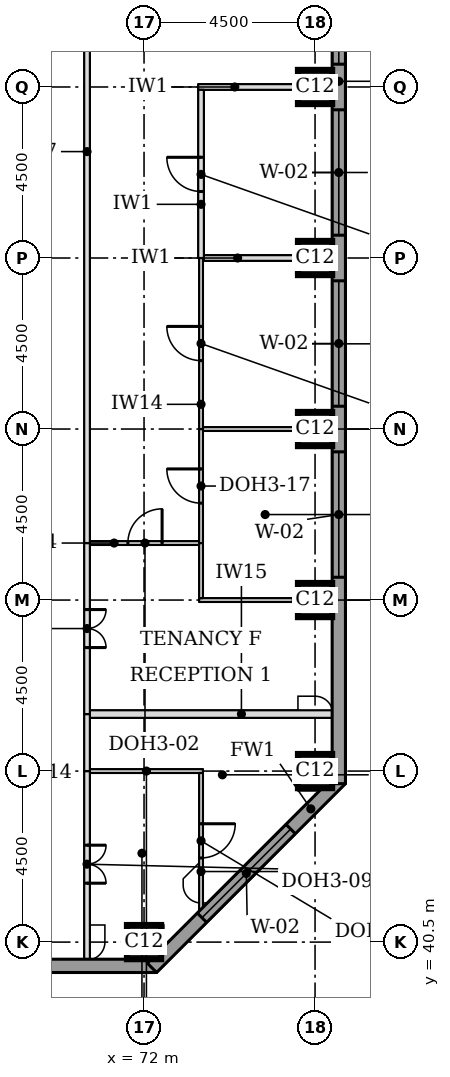
"""IFC4 building model, lengths in metres.
Left out: names, types, materials, properties, quantities, classifications, styles, units other than length and angle.
Written with IfcOpenShell. Run it as: python <this file> out.ifc"""

import sys

from ifc_helpers import new_model, si_unit, direction, frame, frame_2d, origin, origin_2d, place, context, subcontext, project, spatial, rectangle, extrude, element, fill, save


model = new_model("IFC4")
c1 = context("Model", 3, precision=1e-05, world=origin(), true_north=direction((0.0, 1.0)))
c2 = subcontext(c1, "Body", "Model", "MODEL_VIEW")
j1 = project(units=[si_unit("LENGTHUNIT", "METRE"), si_unit("PLANEANGLEUNIT", "RADIAN")], contexts=[c1])
p1 = place(None, origin())
s1 = spatial("IfcSite", under=j1, at=p1, CompositionType="ELEMENT")
p2 = place(p1, origin())
s2 = spatial("IfcBuilding", under=s1, at=p2, CompositionType="ELEMENT")
p3 = place(p2, frame((0.0, 0.0, 162.5)))
s3 = spatial("IfcBuildingStorey", under=s2, at=p3, CompositionType="ELEMENT", Elevation=162.5)
for number, where, z_axis, x_axis in (
    (1, (72.0, 40.5, 0.0), (0.0, 0.0, 1.0), (1.0, 0.0, 0.0)),
    (2, (76.5, 45.0, 0.0), (0.0, 0.0, 1.0), (1.0, 0.0, 0.0)),
    (3, (76.5, 49.5, 0.0), (0.0, 0.0, 1.0), (1.0, 0.0, 0.0)),
    (4, (76.5, 54.0, 0.0), (0.0, 0.0, 1.0), (1.0, 0.0, 0.0)),
    (5, (76.5, 58.5, 0.0), (0.0, 0.0, 1.0), (1.0, 0.0, 0.0)),
    (6, (76.5, 63.0, 0.0), (0.0, 0.0, 1.0), (1.0, 0.0, 0.0)),
):
    element("IfcColumn", number, at=place(p3, frame(where, z_axis=z_axis, x_axis=x_axis)), inside=s3, PredefinedType="COLUMN", context=c2, shape_type="SweptSolid", body=[
        extrude(rectangle(XDim=0.9, YDim=0.9, at=origin_2d()), origin(), (0.0, 0.0, 1.0), 3.7),
    ])
p4 = place(p3, frame((36.0, 39.875, 0.0), z_axis=(0.0, 0.0, 1.0), x_axis=(1.0, 0.0, 0.0)))
e7 = element("IfcWall", 7, at=p4, inside=s3, PredefinedType="STANDARD", context=c2, shape_type="SweptSolid", body=[
    extrude(rectangle(XDim=36.331, YDim=0.35, at=frame_2d((18.166, 0.0))), origin(), (0.0, 0.0, 1.0), 3.525),
])
p5 = place(p4, frame((5.1, 0.0, 0.9)))
e8 = element("IfcOpeningElement", 8, at=p5, cuts=e7, PredefinedType="OPENING", context=c2, shape_type="SweptSolid", body=[
    extrude(rectangle(XDim=3.3, YDim=1.9, at=frame_2d((1.65, 0.95))), frame((0.0, 0.185, 0.0), z_axis=(0.0, -1.0, 0.0), x_axis=(1.0, 0.0, 0.0)), (0.0, 0.0, 1.0), 0.37),
])
p6 = place(p4, frame((9.6, 0.0, 0.9)))
e9 = element("IfcOpeningElement", 9, at=p6, cuts=e7, PredefinedType="OPENING", context=c2, shape_type="SweptSolid", body=[
    extrude(rectangle(XDim=3.3, YDim=1.9, at=frame_2d((1.65, 0.95))), frame((0.0, 0.185, 0.0), z_axis=(0.0, -1.0, 0.0), x_axis=(1.0, 0.0, 0.0)), (0.0, 0.0, 1.0), 0.37),
])
p7 = place(p4, frame((14.1, 0.0, 0.9)))
e10 = element("IfcOpeningElement", 10, at=p7, cuts=e7, PredefinedType="OPENING", context=c2, shape_type="SweptSolid", body=[
    extrude(rectangle(XDim=3.3, YDim=1.9, at=frame_2d((1.65, 0.95))), frame((0.0, 0.185, 0.0), z_axis=(0.0, -1.0, 0.0), x_axis=(1.0, 0.0, 0.0)), (0.0, 0.0, 1.0), 0.37),
])
p8 = place(p4, frame((18.6, 0.0, 0.9)))
e11 = element("IfcOpeningElement", 11, at=p8, cuts=e7, PredefinedType="OPENING", context=c2, shape_type="SweptSolid", body=[
    extrude(rectangle(XDim=3.3, YDim=1.9, at=frame_2d((1.65, 0.95))), frame((0.0, 0.185, 0.0), z_axis=(0.0, -1.0, 0.0), x_axis=(1.0, 0.0, 0.0)), (0.0, 0.0, 1.0), 0.37),
])
p9 = place(p4, frame((23.1, 0.0, 0.9)))
e12 = element("IfcOpeningElement", 12, at=p9, cuts=e7, PredefinedType="OPENING", context=c2, shape_type="SweptSolid", body=[
    extrude(rectangle(XDim=3.3, YDim=1.9, at=frame_2d((1.65, 0.95))), frame((0.0, 0.185, 0.0), z_axis=(0.0, -1.0, 0.0), x_axis=(1.0, 0.0, 0.0)), (0.0, 0.0, 1.0), 0.37),
])
p10 = place(p4, frame((27.6, 0.0, 0.9)))
e13 = element("IfcOpeningElement", 13, at=p10, cuts=e7, PredefinedType="OPENING", context=c2, shape_type="SweptSolid", body=[
    extrude(rectangle(XDim=3.3, YDim=1.9, at=frame_2d((1.65, 0.95))), frame((0.0, 0.185, 0.0), z_axis=(0.0, -1.0, 0.0), x_axis=(1.0, 0.0, 0.0)), (0.0, 0.0, 1.0), 0.37),
])
p11 = place(p3, frame((72.208, 39.824, 0.0), z_axis=(0.0, 0.0, 1.0), x_axis=(0.707106781187, 0.707106781187, 0.0)))
e14 = element("IfcWall", 14, at=p11, inside=s3, PredefinedType="STANDARD", context=c2, shape_type="SweptSolid", body=[
    extrude(rectangle(XDim=7.027, YDim=0.35, at=frame_2d((3.513, 0.0))), origin(), (0.0, 0.0, 1.0), 3.525),
])
p12 = place(p11, frame((1.863, 0.0, 0.9)))
e15 = element("IfcOpeningElement", 15, at=p12, cuts=e14, PredefinedType="OPENING", context=c2, shape_type="SweptSolid", body=[
    extrude(rectangle(XDim=3.3, YDim=1.9, at=frame_2d((1.65, 0.95))), frame((0.0, 0.185, 0.0), z_axis=(0.0, -1.0, 0.0), x_axis=(1.0, 0.0, 0.0)), (0.0, 0.0, 1.0), 0.37),
])
p13 = place(p3, frame((77.125, 44.669, 0.0), z_axis=(0.0, 0.0, 1.0), x_axis=(0.0, 1.0, 0.0)))
e16 = element("IfcWall", 16, at=p13, inside=s3, PredefinedType="STANDARD", context=c2, shape_type="SweptSolid", body=[
    extrude(rectangle(XDim=32.163, YDim=0.35, at=frame_2d((16.081, 0.0))), origin(), (0.0, 0.0, 1.0), 3.525),
])
p14 = place(p13, frame((5.431, 0.0, 0.9)))
e17 = element("IfcOpeningElement", 17, at=p14, cuts=e16, PredefinedType="OPENING", context=c2, shape_type="SweptSolid", body=[
    extrude(rectangle(XDim=3.3, YDim=1.9, at=frame_2d((1.65, 0.95))), frame((0.0, 0.185, 0.0), z_axis=(0.0, -1.0, 0.0), x_axis=(1.0, 0.0, 0.0)), (0.0, 0.0, 1.0), 0.37),
])
p15 = place(p13, frame((9.931, 0.0, 0.9)))
e18 = element("IfcOpeningElement", 18, at=p15, cuts=e16, PredefinedType="OPENING", context=c2, shape_type="SweptSolid", body=[
    extrude(rectangle(XDim=3.3, YDim=1.9, at=frame_2d((1.65, 0.95))), frame((0.0, 0.185, 0.0), z_axis=(0.0, -1.0, 0.0), x_axis=(1.0, 0.0, 0.0)), (0.0, 0.0, 1.0), 0.37),
])
p16 = place(p13, frame((14.431, 0.0, 0.9)))
e19 = element("IfcOpeningElement", 19, at=p16, cuts=e16, PredefinedType="OPENING", context=c2, shape_type="SweptSolid", body=[
    extrude(rectangle(XDim=3.3, YDim=1.9, at=frame_2d((1.65, 0.95))), frame((0.0, 0.185, 0.0), z_axis=(0.0, -1.0, 0.0), x_axis=(1.0, 0.0, 0.0)), (0.0, 0.0, 1.0), 0.37),
])
p17 = place(p13, frame((18.931, 0.0, 0.9)))
e20 = element("IfcOpeningElement", 20, at=p17, cuts=e16, PredefinedType="OPENING", context=c2, shape_type="SweptSolid", body=[
    extrude(rectangle(XDim=3.3, YDim=1.9, at=frame_2d((1.65, 0.95))), frame((0.0, 0.185, 0.0), z_axis=(0.0, -1.0, 0.0), x_axis=(1.0, 0.0, 0.0)), (0.0, 0.0, 1.0), 0.37),
])
p18 = place(p13, frame((23.431, 0.0, 0.9)))
e21 = element("IfcOpeningElement", 21, at=p18, cuts=e16, PredefinedType="OPENING", context=c2, shape_type="SweptSolid", body=[
    extrude(rectangle(XDim=3.3, YDim=1.9, at=frame_2d((1.65, 0.95))), frame((0.0, 0.185, 0.0), z_axis=(0.0, -1.0, 0.0), x_axis=(1.0, 0.0, 0.0)), (0.0, 0.0, 1.0), 0.37),
])
p19 = place(p3, frame((70.575, 45.0, 0.0), z_axis=(0.0, 0.0, 1.0), x_axis=(1.0, 0.0, 0.0)))
e22 = element("IfcWall", 22, at=p19, inside=s3, PredefinedType="PARTITIONING", context=c2, shape_type="SweptSolid", body=[
    extrude(rectangle(XDim=2.975, YDim=0.1, at=frame_2d((1.488, 0.0))), origin(), (0.0, 0.0, 1.0), 3.096),
])
p20 = place(p3, frame((70.575, 46.5, 0.0), z_axis=(0.0, 0.0, 1.0), x_axis=(1.0, 0.0, 0.0)))
e23 = element("IfcWall", 23, at=p20, inside=s3, PredefinedType="PARTITIONING", context=c2, shape_type="SweptSolid", body=[
    extrude(rectangle(XDim=6.375, YDim=0.2, at=frame_2d((3.188, 0.0))), origin(), (0.0, 0.0, 1.0), 3.55),
])
p21 = place(p3, frame((73.45, 49.5, 0.0), z_axis=(0.0, 0.0, 1.0), x_axis=(1.0, 0.0, 0.0)))
e24 = element("IfcWall", 24, at=p21, inside=s3, PredefinedType="PARTITIONING", context=c2, shape_type="SweptSolid", body=[
    extrude(rectangle(XDim=3.5, YDim=0.1, at=frame_2d((1.75, 0.0))), origin(), (0.0, 0.0, 1.0), 3.55),
])
p22 = place(p3, frame((70.575, 51.0, 0.0), z_axis=(0.0, 0.0, 1.0), x_axis=(1.0, 0.0, 0.0)))
e25 = element("IfcWall", 25, at=p22, inside=s3, PredefinedType="PARTITIONING", context=c2, shape_type="SweptSolid", body=[
    extrude(rectangle(XDim=2.875, YDim=0.1, at=frame_2d((1.438, 0.0))), origin(), (0.0, 0.0, 1.0), 3.55),
])
p23 = place(p22, frame((1.0, 0.0, 0.0)))
e26 = element("IfcOpeningElement", 26, at=p23, cuts=e25, PredefinedType="OPENING", context=c2, shape_type="SweptSolid", body=[
    extrude(rectangle(XDim=0.9, YDim=2.1, at=frame_2d((0.45, 1.05))), frame((0.0, 0.06, 0.0), z_axis=(0.0, -1.0, 0.0), x_axis=(1.0, 0.0, 0.0)), (0.0, 0.0, 1.0), 0.12),
])
p24 = place(p3, frame((73.55, 54.0, 0.0), z_axis=(0.0, 0.0, 1.0), x_axis=(1.0, 0.0, 0.0)))
e27 = element("IfcWall", 27, at=p24, inside=s3, PredefinedType="PARTITIONING", context=c2, shape_type="SweptSolid", body=[
    extrude(rectangle(XDim=3.4, YDim=0.1, at=frame_2d((1.7, 0.0))), origin(), (0.0, 0.0, 1.0), 3.55),
])
p25 = place(p3, frame((73.575, 58.5, 0.0), z_axis=(0.0, 0.0, 1.0), x_axis=(1.0, 0.0, 0.0)))
e28 = element("IfcWall", 28, at=p25, inside=s3, PredefinedType="PARTITIONING", context=c2, shape_type="SweptSolid", body=[
    extrude(rectangle(XDim=3.375, YDim=0.15, at=frame_2d((1.688, 0.0))), origin(), (0.0, 0.0, 1.0), 3.55),
])
p26 = place(p3, frame((73.425, 63.0, 0.0), z_axis=(0.0, 0.0, 1.0), x_axis=(1.0, 0.0, 0.0)))
e29 = element("IfcWall", 29, at=p26, inside=s3, PredefinedType="PARTITIONING", context=c2, shape_type="SweptSolid", body=[
    extrude(rectangle(XDim=3.525, YDim=0.15, at=frame_2d((1.762, 0.0))), origin(), (0.0, 0.0, 1.0), 3.55),
])
p27 = place(p3, frame((70.5, 40.05, 0.0), z_axis=(0.0, 0.0, 1.0), x_axis=(0.0, 1.0, 0.0)))
e30 = element("IfcWall", 30, at=p27, inside=s3, PredefinedType="PARTITIONING", context=c2, shape_type="SweptSolid", body=[
    extrude(rectangle(XDim=4.95, YDim=0.15, at=frame_2d((2.475, 0.0))), origin(), (0.0, 0.0, 1.0), 3.55),
])
p28 = place(p27, frame((2.0, 0.0, 0.0)))
e31 = element("IfcOpeningElement", 31, at=p28, cuts=e30, PredefinedType="OPENING", context=c2, shape_type="SweptSolid", body=[
    extrude(rectangle(XDim=1.0, YDim=2.1, at=frame_2d((0.5, 1.05))), frame((0.0, 0.085, 0.0), z_axis=(0.0, -1.0, 0.0), x_axis=(1.0, 0.0, 0.0)), (0.0, 0.0, 1.0), 0.17),
])
p29 = place(p3, frame((73.5, 41.364, 0.0), z_axis=(0.0, 0.0, 1.0), x_axis=(0.0, 1.0, 0.0)))
e32 = element("IfcWall", 32, at=p29, inside=s3, PredefinedType="PARTITIONING", context=c2, shape_type="SweptSolid", body=[
    extrude(rectangle(XDim=3.586, YDim=0.1, at=frame_2d((1.793, 0.0))), origin(), (0.0, 0.0, 1.0), 3.55),
])
p30 = place(p29, frame((1.35, 0.0, 0.0)))
e33 = element("IfcOpeningElement", 33, at=p30, cuts=e32, PredefinedType="OPENING", context=c2, shape_type="SweptSolid", body=[
    extrude(rectangle(XDim=0.9, YDim=2.1, at=frame_2d((0.45, 1.05))), frame((0.0, 0.06, 0.0), z_axis=(0.0, -1.0, 0.0), x_axis=(1.0, 0.0, 0.0)), (0.0, 0.0, 1.0), 0.12),
])
p31 = place(p3, frame((70.5, 45.0, 0.0), z_axis=(0.0, 0.0, 1.0), x_axis=(0.0, 1.0, 0.0)))
e34 = element("IfcWall", 34, at=p31, inside=s3, PredefinedType="PARTITIONING", context=c2, shape_type="SweptSolid", body=[
    extrude(rectangle(XDim=1.5, YDim=0.15, at=frame_2d((0.75, 0.0))), origin(), (0.0, 0.0, 1.0), 3.55),
])
p32 = place(p3, frame((70.5, 46.5, 0.0), z_axis=(0.0, 0.0, 1.0), x_axis=(0.0, 1.0, 0.0)))
e35 = element("IfcWall", 35, at=p32, inside=s3, PredefinedType="PARTITIONING", context=c2, shape_type="SweptSolid", body=[
    extrude(rectangle(XDim=4.5, YDim=0.15, at=frame_2d((2.25, 0.0))), origin(), (0.0, 0.0, 1.0), 3.55),
])
p33 = place(p32, frame((1.75, 0.0, 0.0)))
e36 = element("IfcOpeningElement", 36, at=p33, cuts=e35, PredefinedType="OPENING", context=c2, shape_type="SweptSolid", body=[
    extrude(rectangle(XDim=1.0, YDim=2.1, at=frame_2d((0.5, 1.05))), frame((0.0, 0.085, 0.0), z_axis=(0.0, -1.0, 0.0), x_axis=(1.0, 0.0, 0.0)), (0.0, 0.0, 1.0), 0.17),
])
p34 = place(p3, frame((73.5, 49.55, 0.0), z_axis=(0.0, 0.0, 1.0), x_axis=(0.0, 1.0, 0.0)))
e37 = element("IfcWall", 37, at=p34, inside=s3, PredefinedType="PARTITIONING", context=c2, shape_type="SweptSolid", body=[
    extrude(rectangle(XDim=1.45, YDim=0.1, at=frame_2d((0.725, 0.0))), origin(), (0.0, 0.0, 1.0), 3.55),
])
p35 = place(p3, frame((70.5, 51.0, 0.0), z_axis=(0.0, 0.0, 1.0), x_axis=(0.0, 1.0, 0.0)))
e38 = element("IfcWall", 38, at=p35, inside=s3, PredefinedType="PARTITIONING", context=c2, shape_type="SweptSolid", body=[
    extrude(rectangle(XDim=27.0, YDim=0.15, at=frame_2d((13.5, 0.0))), origin(), (0.0, 0.0, 1.0), 3.55),
])
p36 = place(p3, frame((73.5, 51.0, 0.0), z_axis=(0.0, 0.0, 1.0), x_axis=(0.0, 1.0, 0.0)))
e39 = element("IfcWall", 39, at=p36, inside=s3, PredefinedType="PARTITIONING", context=c2, shape_type="SweptSolid", body=[
    extrude(rectangle(XDim=3.0, YDim=0.1, at=frame_2d((1.5, 0.0))), origin(), (0.0, 0.0, 1.0), 3.55),
])
p37 = place(p36, frame((1.05, 0.0, 0.0)))
e40 = element("IfcOpeningElement", 40, at=p37, cuts=e39, PredefinedType="OPENING", context=c2, shape_type="SweptSolid", body=[
    extrude(rectangle(XDim=0.9, YDim=2.1, at=frame_2d((0.45, 1.05))), frame((0.0, 0.06, 0.0), z_axis=(0.0, -1.0, 0.0), x_axis=(1.0, 0.0, 0.0)), (0.0, 0.0, 1.0), 0.12),
])
p38 = place(p3, frame((73.5, 54.0, 0.0), z_axis=(0.0, 0.0, 1.0), x_axis=(0.0, 1.0, 0.0)))
e41 = element("IfcWall", 41, at=p38, inside=s3, PredefinedType="PARTITIONING", context=c2, shape_type="SweptSolid", body=[
    extrude(rectangle(XDim=4.5, YDim=0.1, at=frame_2d((2.25, 0.0))), origin(), (0.0, 0.0, 1.0), 3.55),
])
p39 = place(p38, frame((1.8, 0.0, 0.0)))
e42 = element("IfcOpeningElement", 42, at=p39, cuts=e41, PredefinedType="OPENING", context=c2, shape_type="SweptSolid", body=[
    extrude(rectangle(XDim=0.9, YDim=2.1, at=frame_2d((0.45, 1.05))), frame((0.0, 0.06, 0.0), z_axis=(0.0, -1.0, 0.0), x_axis=(1.0, 0.0, 0.0)), (0.0, 0.0, 1.0), 0.12),
])
p40 = place(p3, frame((73.5, 58.5, 0.0), z_axis=(0.0, 0.0, 1.0), x_axis=(0.0, 1.0, 0.0)))
e43 = element("IfcWall", 43, at=p40, inside=s3, PredefinedType="PARTITIONING", context=c2, shape_type="SweptSolid", body=[
    extrude(rectangle(XDim=4.425, YDim=0.15, at=frame_2d((2.212, 0.0))), origin(), (0.0, 0.0, 1.0), 3.55),
])
p41 = place(p40, frame((1.75, 0.0, 0.0)))
e44 = element("IfcOpeningElement", 44, at=p41, cuts=e43, PredefinedType="OPENING", context=c2, shape_type="SweptSolid", body=[
    extrude(rectangle(XDim=0.9, YDim=2.1, at=frame_2d((0.45, 1.05))), frame((0.0, 0.085, 0.0), z_axis=(0.0, -1.0, 0.0), x_axis=(1.0, 0.0, 0.0)), (0.0, 0.0, 1.0), 0.17),
])
p42 = place(p12, origin())
e45 = element("IfcWindow", 45, at=p42, inside=s3, PartitioningType="SINGLE_PANEL", PredefinedType="WINDOW", context=c2, shape_type="SweptSolid", body=[
    extrude(rectangle(XDim=3.3, YDim=1.9, at=frame_2d((1.65, 0.95))), frame((0.0, 0.085, 0.0), z_axis=(0.0, -1.0, 0.0), x_axis=(1.0, 0.0, 0.0)), (0.0, 0.0, 1.0), 0.06),
])
fill(e15, e45)
p43 = place(p14, origin())
e46 = element("IfcWindow", 46, at=p43, inside=s3, PartitioningType="SINGLE_PANEL", PredefinedType="WINDOW", context=c2, shape_type="SweptSolid", body=[
    extrude(rectangle(XDim=3.3, YDim=1.9, at=frame_2d((1.65, 0.95))), frame((0.0, 0.085, 0.0), z_axis=(0.0, -1.0, 0.0), x_axis=(1.0, 0.0, 0.0)), (0.0, 0.0, 1.0), 0.06),
])
fill(e17, e46)
p44 = place(p15, origin())
e47 = element("IfcWindow", 47, at=p44, inside=s3, PartitioningType="SINGLE_PANEL", PredefinedType="WINDOW", context=c2, shape_type="SweptSolid", body=[
    extrude(rectangle(XDim=3.3, YDim=1.9, at=frame_2d((1.65, 0.95))), frame((0.0, 0.085, 0.0), z_axis=(0.0, -1.0, 0.0), x_axis=(1.0, 0.0, 0.0)), (0.0, 0.0, 1.0), 0.06),
])
fill(e18, e47)
p45 = place(p16, origin())
e48 = element("IfcWindow", 48, at=p45, inside=s3, PartitioningType="SINGLE_PANEL", PredefinedType="WINDOW", context=c2, shape_type="SweptSolid", body=[
    extrude(rectangle(XDim=3.3, YDim=1.9, at=frame_2d((1.65, 0.95))), frame((0.0, 0.085, 0.0), z_axis=(0.0, -1.0, 0.0), x_axis=(1.0, 0.0, 0.0)), (0.0, 0.0, 1.0), 0.06),
])
fill(e19, e48)
p46 = place(p17, origin())
e49 = element("IfcWindow", 49, at=p46, inside=s3, PartitioningType="SINGLE_PANEL", PredefinedType="WINDOW", context=c2, shape_type="SweptSolid", body=[
    extrude(rectangle(XDim=3.3, YDim=1.9, at=frame_2d((1.65, 0.95))), frame((0.0, 0.085, 0.0), z_axis=(0.0, -1.0, 0.0), x_axis=(1.0, 0.0, 0.0)), (0.0, 0.0, 1.0), 0.06),
])
fill(e20, e49)
p47 = place(p28, frame((1.0, 0.0, 0.0), z_axis=(0.0, 0.0, 1.0), x_axis=(-1.0, 0.0, 0.0)))
e50 = element("IfcDoor", 50, at=p47, inside=s3, OperationType="DOUBLE_DOOR_SINGLE_SWING", PredefinedType="DOOR", context=c2, shape_type="SweptSolid", body=[
    extrude(rectangle(XDim=1.0, YDim=2.1, at=frame_2d((0.5, 1.05))), frame((0.0, 0.025, 0.0), z_axis=(0.0, -1.0, 0.0), x_axis=(1.0, 0.0, 0.0)), (0.0, 0.0, 1.0), 0.05),
])
fill(e31, e50)
p48 = place(p30, frame((0.9, 0.0, 0.0), z_axis=(0.0, 0.0, 1.0), x_axis=(-1.0, 0.0, 0.0)))
e51 = element("IfcDoor", 51, at=p48, inside=s3, OperationType="SINGLE_SWING_LEFT", PredefinedType="DOOR", context=c2, shape_type="SweptSolid", body=[
    extrude(rectangle(XDim=0.9, YDim=2.1, at=frame_2d((0.45, 1.05))), frame((0.0, 0.025, 0.0), z_axis=(0.0, -1.0, 0.0), x_axis=(1.0, 0.0, 0.0)), (0.0, 0.0, 1.0), 0.05),
])
fill(e33, e51)
p49 = place(p33, frame((1.0, 0.0, 0.0), z_axis=(0.0, 0.0, 1.0), x_axis=(-1.0, 0.0, 0.0)))
e52 = element("IfcDoor", 52, at=p49, inside=s3, OperationType="DOUBLE_DOOR_SINGLE_SWING", PredefinedType="DOOR", context=c2, shape_type="SweptSolid", body=[
    extrude(rectangle(XDim=1.0, YDim=2.1, at=frame_2d((0.5, 1.05))), frame((0.0, 0.025, 0.0), z_axis=(0.0, -1.0, 0.0), x_axis=(1.0, 0.0, 0.0)), (0.0, 0.0, 1.0), 0.05),
])
fill(e36, e52)
p50 = place(p23, origin())
e53 = element("IfcDoor", 53, at=p50, inside=s3, OperationType="SINGLE_SWING_RIGHT", PredefinedType="DOOR", context=c2, shape_type="SweptSolid", body=[
    extrude(rectangle(XDim=0.9, YDim=2.1, at=frame_2d((0.45, 1.05))), frame((0.0, 0.025, 0.0), z_axis=(0.0, -1.0, 0.0), x_axis=(1.0, 0.0, 0.0)), (0.0, 0.0, 1.0), 0.05),
])
fill(e26, e53)
p51 = place(p37, origin())
e54 = element("IfcDoor", 54, at=p51, inside=s3, OperationType="SINGLE_SWING_RIGHT", PredefinedType="DOOR", context=c2, shape_type="SweptSolid", body=[
    extrude(rectangle(XDim=0.9, YDim=2.1, at=frame_2d((0.45, 1.05))), frame((0.0, 0.025, 0.0), z_axis=(0.0, -1.0, 0.0), x_axis=(1.0, 0.0, 0.0)), (0.0, 0.0, 1.0), 0.05),
])
fill(e40, e54)
p52 = place(p39, origin())
e55 = element("IfcDoor", 55, at=p52, inside=s3, OperationType="SINGLE_SWING_RIGHT", PredefinedType="DOOR", context=c2, shape_type="SweptSolid", body=[
    extrude(rectangle(XDim=0.9, YDim=2.1, at=frame_2d((0.45, 1.05))), frame((0.0, 0.025, 0.0), z_axis=(0.0, -1.0, 0.0), x_axis=(1.0, 0.0, 0.0)), (0.0, 0.0, 1.0), 0.05),
])
fill(e42, e55)
p53 = place(p41, origin())
e56 = element("IfcDoor", 56, at=p53, inside=s3, OperationType="SINGLE_SWING_RIGHT", PredefinedType="DOOR", context=c2, shape_type="SweptSolid", body=[
    extrude(rectangle(XDim=0.9, YDim=2.1, at=frame_2d((0.45, 1.05))), frame((0.0, 0.025, 0.0), z_axis=(0.0, -1.0, 0.0), x_axis=(1.0, 0.0, 0.0)), (0.0, 0.0, 1.0), 0.05),
])
fill(e44, e56)
save(model, sys.argv[1])
